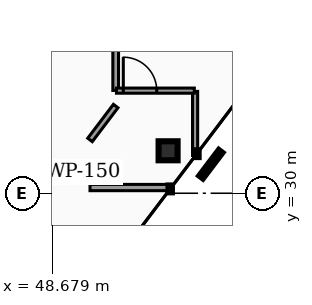
"""IFC4 building model, lengths in metres.
Left out: names, types, materials, properties, quantities, classifications, styles, units other than length and angle.
Written with IfcOpenShell. Run it as: python <this file> out.ifc"""

import sys

from ifc_helpers import new_model, si_unit, direction, frame, frame_2d, origin, origin_2d, place, context, subcontext, project, spatial, rectangle, hollow_rectangle, extrude, element, fill, save


model = new_model("IFC4")
c1 = context("Model", 3, precision=1e-05, world=origin(), true_north=direction((0.0, 1.0)))
c2 = subcontext(c1, "Body", "Model", "MODEL_VIEW")
j1 = project(units=[si_unit("LENGTHUNIT", "METRE"), si_unit("PLANEANGLEUNIT", "RADIAN")], contexts=[c1])
p1 = place(None, origin())
s1 = spatial("IfcSite", under=j1, at=p1, CompositionType="ELEMENT")
p2 = place(p1, origin())
s2 = spatial("IfcBuilding", under=s1, at=p2, CompositionType="ELEMENT")
p3 = place(p2, frame((0.0, 0.0, 258.4)))
s3 = spatial("IfcBuildingStorey", under=s2, at=p3, CompositionType="ELEMENT", Elevation=258.4)
p4 = place(p3, frame((51.729, 31.117, 0.0), z_axis=(0.0, 0.0, 1.0), x_axis=(1.0, 0.0, 0.0)))
e1 = element("IfcColumn", 1, at=p4, inside=s3, PredefinedType="COLUMN", context=c2, shape_type="SweptSolid", body=[
    extrude(hollow_rectangle(XDim=0.5, YDim=0.5, WallThickness=0.025, at=origin_2d()), origin(), (0.0, 0.0, 1.0), 3.18),
])
p5 = place(p3, frame((50.35, 32.705, 0.0), z_axis=(0.0, 0.0, 1.0), x_axis=(0.0, 1.0, 0.0)))
e2 = element("IfcWall", 2, at=p5, inside=s3, PredefinedType="PARTITIONING", context=c2, shape_type="SweptSolid", body=[
    extrude(rectangle(XDim=10.845, YDim=0.15, at=frame_2d((5.422, 0.0))), origin(), (0.0, 0.0, 1.0), 2.235),
])
p6 = place(p5, frame((4.952, 0.0, 0.0)))
e3 = element("IfcOpeningElement", 3, at=p6, cuts=e2, PredefinedType="OPENING", context=c2, shape_type="SweptSolid", body=[
    extrude(rectangle(XDim=0.94, YDim=2.05, at=frame_2d((0.47, 1.025))), frame((0.0, 0.085, 0.0), z_axis=(0.0, -1.0, 0.0), x_axis=(1.0, 0.0, 0.0)), (0.0, 0.0, 1.0), 0.17),
])
p7 = place(p3, frame((49.674, 31.403, 0.0), z_axis=(0.0, 0.0, 1.0), x_axis=(0.603937499622, 0.797031678511, 0.0)))
e4 = element("IfcWall", 4, at=p7, inside=s3, PredefinedType="PARTITIONING", context=c2, shape_type="SweptSolid", body=[
    extrude(rectangle(XDim=1.119, YDim=0.15, at=frame_2d((0.56, 0.0))), origin(), (0.0, 0.0, 1.0), 2.235),
])
p8 = place(p3, frame((49.674, 30.15, 0.0), z_axis=(0.0, 0.0, 1.0), x_axis=(1.0, 0.0, 0.0)))
e5 = element("IfcWall", 5, at=p8, inside=s3, PredefinedType="PARTITIONING", context=c2, shape_type="SweptSolid", body=[
    extrude(rectangle(XDim=2.122, YDim=0.165, at=frame_2d((1.061, 0.0))), origin(), (0.0, 0.0, 1.0), 2.235),
])
p9 = place(p3, frame((52.439, 30.994, 0.0), z_axis=(0.0, 0.0, 1.0), x_axis=(0.0, 1.0, 0.0)))
e6 = element("IfcWall", 6, at=p9, inside=s3, PredefinedType="PARTITIONING", context=c2, shape_type="SweptSolid", body=[
    extrude(rectangle(XDim=1.686, YDim=0.135, at=frame_2d((0.843, 0.0))), origin(), (0.0, 0.0, 1.0), 2.235),
])
p10 = place(p3, frame((50.37, 32.7, 0.0), z_axis=(0.0, 0.0, 1.0), x_axis=(1.0, 0.0, 0.0)))
e7 = element("IfcWall", 7, at=p10, inside=s3, PredefinedType="PARTITIONING", context=c2, shape_type="SweptSolid", body=[
    extrude(rectangle(XDim=2.049, YDim=0.135, at=frame_2d((1.025, 0.0))), origin(), (0.0, 0.0, 1.0), 2.235),
])
p11 = place(p10, frame((0.18, 0.0, 0.0)))
e8 = element("IfcOpeningElement", 8, at=p11, cuts=e7, PredefinedType="OPENING", context=c2, shape_type="SweptSolid", body=[
    extrude(rectangle(XDim=0.88, YDim=2.05, at=frame_2d((0.44, 1.025))), frame((0.0, 0.077, 0.0), z_axis=(0.0, -1.0, 0.0), x_axis=(1.0, 0.0, 0.0)), (0.0, 0.0, 1.0), 0.155),
])
p12 = place(p11, origin())
e9 = element("IfcDoor", 9, at=p12, inside=s3, OperationType="SINGLE_SWING_LEFT", PredefinedType="DOOR", context=c2, shape_type="SweptSolid", body=[
    extrude(rectangle(XDim=0.88, YDim=2.05, at=frame_2d((0.44, 1.025))), frame((0.0, 0.025, 0.0), z_axis=(0.0, -1.0, 0.0), x_axis=(1.0, 0.0, 0.0)), (0.0, 0.0, 1.0), 0.05),
])
fill(e8, e9)
save(model, sys.argv[1])
